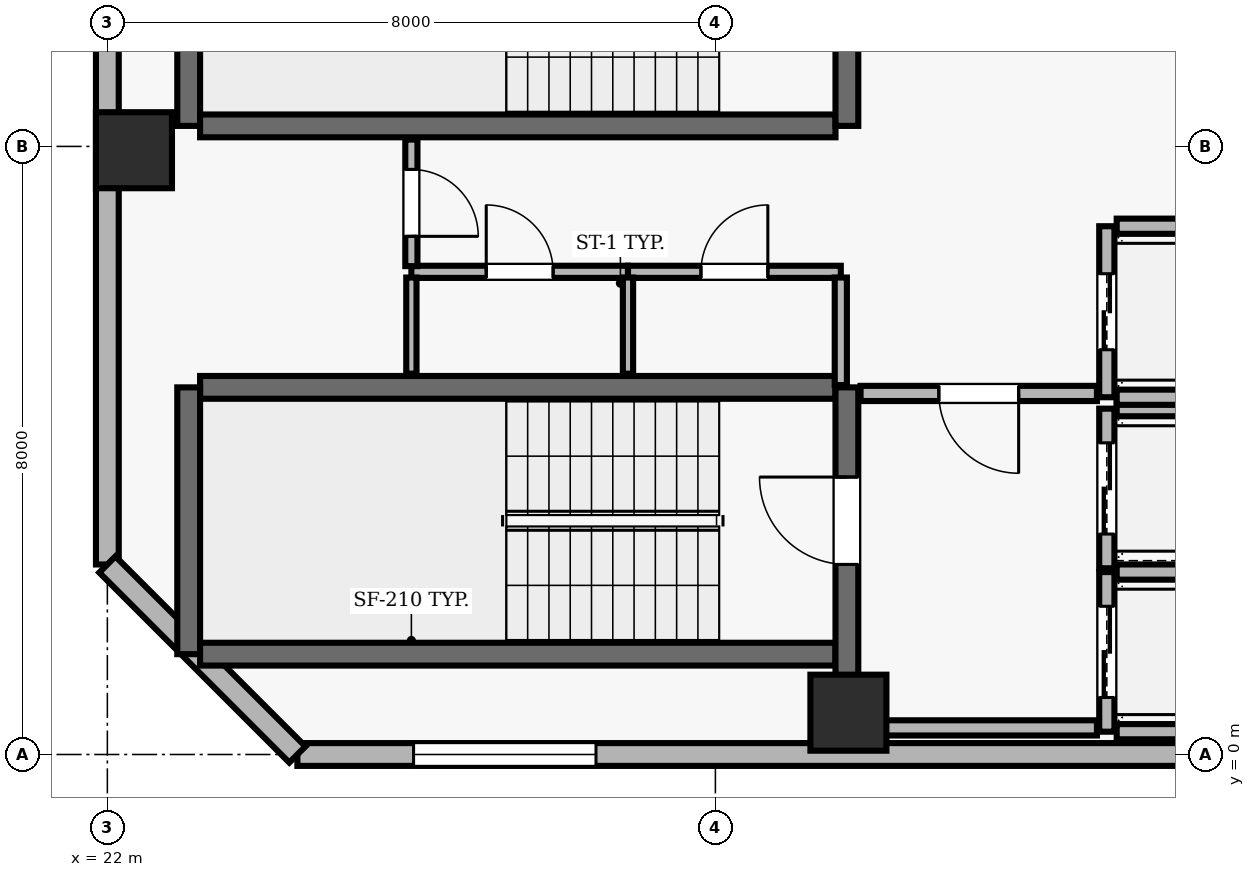
"""IFC4 building model, lengths in metres.
Left out: names, types, materials, properties, quantities, classifications, styles, units other than length and angle.
Written with IfcOpenShell. Run it as: python <this file> out.ifc"""

import sys

from ifc_helpers import new_model, si_unit, direction, frame, frame_2d, origin, origin_2d, place, context, subcontext, project, spatial, rectangle, extrude, element, fill, save


model = new_model("IFC4")
c1 = context("Model", 3, precision=1e-05, world=origin(), true_north=direction((0.0, 1.0)))
c2 = subcontext(c1, "Body", "Model", "MODEL_VIEW")
j1 = project(units=[si_unit("LENGTHUNIT", "METRE"), si_unit("PLANEANGLEUNIT", "RADIAN")], contexts=[c1])
p1 = place(None, origin())
s1 = spatial("IfcSite", under=j1, at=p1, CompositionType="ELEMENT")
p2 = place(p1, origin())
s2 = spatial("IfcBuilding", under=s1, at=p2, CompositionType="ELEMENT")
p3 = place(p2, frame((0.0, 0.0, 179.7)))
s3 = spatial("IfcBuildingStorey", under=s2, at=p3, CompositionType="ELEMENT", Elevation=179.7)
for number, where, z_axis, x_axis in (
    (1, (31.75, 0.55, 0.0), (0.0, 0.0, 1.0), (1.0, 0.0, 0.0)),
    (2, (22.35, 7.95, 0.0), (0.0, 0.0, 1.0), (1.0, 0.0, 0.0)),
):
    element("IfcColumn", number, at=place(p3, frame(where, z_axis=z_axis, x_axis=x_axis)), inside=s3, PredefinedType="COLUMN", context=c2, shape_type="SweptSolid", body=[
        extrude(rectangle(XDim=1.0, YDim=1.0, at=origin_2d()), origin(), (0.0, 0.0, 1.0), 3.9),
    ])
p4 = place(p3, frame((24.5, 0.0, 0.0), z_axis=(0.0, 0.0, 1.0), x_axis=(1.0, 0.0, 0.0)))
e3 = element("IfcWall", 3, at=p4, inside=s3, PredefinedType="SOLIDWALL", context=c2, shape_type="SweptSolid", body=[
    extrude(rectangle(XDim=38.2, YDim=0.3, at=frame_2d((19.1, 0.0))), origin(), (0.0, 0.0, 1.0), 3.69),
])
p5 = place(p4, frame((1.529, 0.0, 0.9)))
e4 = element("IfcOpeningElement", 4, at=p5, cuts=e3, PredefinedType="OPENING", context=c2, shape_type="SweptSolid", body=[
    extrude(rectangle(XDim=2.4, YDim=1.8, at=frame_2d((1.2, 0.9))), frame((0.0, 0.16, 0.0), z_axis=(0.0, -1.0, 0.0), x_axis=(1.0, 0.0, 0.0)), (0.0, 0.0, 1.0), 0.32),
])
p6 = place(p4, frame((17.9, 0.0, 0.9)))
e5 = element("IfcOpeningElement", 5, at=p6, cuts=e3, PredefinedType="OPENING", context=c2, shape_type="SweptSolid", body=[
    extrude(rectangle(XDim=2.4, YDim=1.8, at=frame_2d((1.2, 0.9))), frame((0.0, 0.16, 0.0), z_axis=(0.0, -1.0, 0.0), x_axis=(1.0, 0.0, 0.0)), (0.0, 0.0, 1.0), 0.32),
])
p7 = place(p4, frame((28.814, 0.0, 0.9)))
e6 = element("IfcOpeningElement", 6, at=p7, cuts=e3, PredefinedType="OPENING", context=c2, shape_type="SweptSolid", body=[
    extrude(rectangle(XDim=2.4, YDim=1.8, at=frame_2d((1.2, 0.9))), frame((0.0, 0.16, 0.0), z_axis=(0.0, -1.0, 0.0), x_axis=(1.0, 0.0, 0.0)), (0.0, 0.0, 1.0), 0.32),
])
p8 = place(p4, frame((34.271, 0.0, 0.9)))
e7 = element("IfcOpeningElement", 7, at=p8, cuts=e3, PredefinedType="OPENING", context=c2, shape_type="SweptSolid", body=[
    extrude(rectangle(XDim=2.4, YDim=1.8, at=frame_2d((1.2, 0.9))), frame((0.0, 0.16, 0.0), z_axis=(0.0, -1.0, 0.0), x_axis=(1.0, 0.0, 0.0)), (0.0, 0.0, 1.0), 0.32),
])
p9 = place(p3, frame((22.0, 40.7, 0.0), z_axis=(0.0, 0.0, 1.0), x_axis=(0.0, -1.0, 0.0)))
e8 = element("IfcWall", 8, at=p9, inside=s3, PredefinedType="SOLIDWALL", context=c2, shape_type="SweptSolid", body=[
    extrude(rectangle(XDim=38.2, YDim=0.3, at=frame_2d((19.1, 0.0))), origin(), (0.0, 0.0, 1.0), 3.69),
])
p10 = place(p9, frame((6.7, 0.0, 0.0)))
e9 = element("IfcOpeningElement", 9, at=p10, cuts=e8, PredefinedType="OPENING", context=c2, shape_type="SweptSolid", body=[
    extrude(rectangle(XDim=1.0, YDim=2.2, at=frame_2d((0.5, 1.1))), frame((0.0, 0.16, 0.0), z_axis=(0.0, -1.0, 0.0), x_axis=(1.0, 0.0, 0.0)), (0.0, 0.0, 1.0), 0.32),
])
p11 = place(p9, frame((11.543, 0.0, 0.9)))
e10 = element("IfcOpeningElement", 10, at=p11, cuts=e8, PredefinedType="OPENING", context=c2, shape_type="SweptSolid", body=[
    extrude(rectangle(XDim=2.4, YDim=1.8, at=frame_2d((1.2, 0.9))), frame((0.0, 0.16, 0.0), z_axis=(0.0, -1.0, 0.0), x_axis=(1.0, 0.0, 0.0)), (0.0, 0.0, 1.0), 0.32),
])
p12 = place(p9, frame((18.35, 0.0, 0.9)))
e11 = element("IfcOpeningElement", 11, at=p12, cuts=e8, PredefinedType="OPENING", context=c2, shape_type="SweptSolid", body=[
    extrude(rectangle(XDim=2.4, YDim=1.8, at=frame_2d((1.2, 0.9))), frame((0.0, 0.16, 0.0), z_axis=(0.0, -1.0, 0.0), x_axis=(1.0, 0.0, 0.0)), (0.0, 0.0, 1.0), 0.32),
])
p13 = place(p9, frame((22.907, 0.0, 0.9)))
e12 = element("IfcOpeningElement", 12, at=p13, cuts=e8, PredefinedType="OPENING", context=c2, shape_type="SweptSolid", body=[
    extrude(rectangle(XDim=2.4, YDim=1.8, at=frame_2d((1.2, 0.9))), frame((0.0, 0.16, 0.0), z_axis=(0.0, -1.0, 0.0), x_axis=(1.0, 0.0, 0.0)), (0.0, 0.0, 1.0), 0.32),
])
p14 = place(p9, frame((28.814, 0.0, 0.9)))
e13 = element("IfcOpeningElement", 13, at=p14, cuts=e8, PredefinedType="OPENING", context=c2, shape_type="SweptSolid", body=[
    extrude(rectangle(XDim=2.4, YDim=1.8, at=frame_2d((1.2, 0.9))), frame((0.0, 0.16, 0.0), z_axis=(0.0, -1.0, 0.0), x_axis=(1.0, 0.0, 0.0)), (0.0, 0.0, 1.0), 0.32),
])
p15 = place(p3, frame((22.0, 2.5, 0.0), z_axis=(0.0, 0.0, 1.0), x_axis=(0.707106781187, -0.707106781187, 0.0)))
e14 = element("IfcWall", 14, at=p15, inside=s3, PredefinedType="SOLIDWALL", context=c2, shape_type="SweptSolid", body=[
    extrude(rectangle(XDim=3.536, YDim=0.3, at=frame_2d((1.768, 0.0))), origin(), (0.0, 0.0, 1.0), 3.69),
])
p16 = place(p3, frame((31.58, 4.83, 0.0), z_axis=(0.0, 0.0, 1.0), x_axis=(-1.0, 0.0, 0.0)))
e15 = element("IfcWall", 15, at=p16, inside=s3, PredefinedType="SHEAR", context=c2, shape_type="SweptSolid", body=[
    extrude(rectangle(XDim=8.36, YDim=0.3, at=frame_2d((4.18, 0.0))), origin(), (0.0, 0.0, 1.0), 3.69),
])
p17 = place(p3, frame((23.07, 4.83, 0.0), z_axis=(0.0, 0.0, 1.0), x_axis=(0.0, -1.0, 0.0)))
e16 = element("IfcWall", 16, at=p17, inside=s3, PredefinedType="SHEAR", context=c2, shape_type="SweptSolid", body=[
    extrude(rectangle(XDim=3.51, YDim=0.3, at=frame_2d((1.755, 0.0))), origin(), (0.0, 0.0, 1.0), 3.69),
])
p18 = place(p3, frame((23.22, 1.32, 0.0), z_axis=(0.0, 0.0, 1.0), x_axis=(1.0, 0.0, 0.0)))
e17 = element("IfcWall", 17, at=p18, inside=s3, PredefinedType="SHEAR", context=c2, shape_type="SweptSolid", body=[
    extrude(rectangle(XDim=8.36, YDim=0.3, at=frame_2d((4.18, 0.0))), origin(), (0.0, 0.0, 1.0), 3.69),
])
p19 = place(p3, frame((31.73, 0.96, 0.0), z_axis=(0.0, 0.0, 1.0), x_axis=(0.0, 1.0, 0.0)))
e18 = element("IfcWall", 18, at=p19, inside=s3, PredefinedType="SHEAR", context=c2, shape_type="SweptSolid", body=[
    extrude(rectangle(XDim=3.87, YDim=0.3, at=frame_2d((1.935, 0.0))), origin(), (0.0, 0.0, 1.0), 3.69),
])
p20 = place(p19, frame((1.54, 0.0, 0.0)))
e19 = element("IfcOpeningElement", 19, at=p20, cuts=e18, PredefinedType="OPENING", context=c2, shape_type="SweptSolid", body=[
    extrude(rectangle(XDim=1.15, YDim=2.15, at=frame_2d((0.575, 1.075))), frame((0.0, 0.16, 0.0), z_axis=(0.0, -1.0, 0.0), x_axis=(1.0, 0.0, 0.0)), (0.0, 0.0, 1.0), 0.32),
])
p21 = place(p3, frame((23.07, 11.78, 0.0), z_axis=(0.0, 0.0, 1.0), x_axis=(0.0, -1.0, 0.0)))
e20 = element("IfcWall", 20, at=p21, inside=s3, PredefinedType="SHEAR", context=c2, shape_type="SweptSolid", body=[
    extrude(rectangle(XDim=3.51, YDim=0.3, at=frame_2d((1.755, 0.0))), origin(), (0.0, 0.0, 1.0), 3.69),
])
p22 = place(p3, frame((23.22, 8.27, 0.0), z_axis=(0.0, 0.0, 1.0), x_axis=(1.0, 0.0, 0.0)))
e21 = element("IfcWall", 21, at=p22, inside=s3, PredefinedType="SHEAR", context=c2, shape_type="SweptSolid", body=[
    extrude(rectangle(XDim=8.36, YDim=0.3, at=frame_2d((4.18, 0.0))), origin(), (0.0, 0.0, 1.0), 3.69),
])
p23 = place(p3, frame((31.73, 8.27, 0.0), z_axis=(0.0, 0.0, 1.0), x_axis=(0.0, 1.0, 0.0)))
e22 = element("IfcWall", 22, at=p23, inside=s3, PredefinedType="SHEAR", context=c2, shape_type="SweptSolid", body=[
    extrude(rectangle(XDim=3.51, YDim=0.3, at=frame_2d((1.755, 0.0))), origin(), (0.0, 0.0, 1.0), 3.69),
])
p24 = place(p23, frame((1.18, 0.0, 0.0)))
e23 = element("IfcOpeningElement", 23, at=p24, cuts=e22, PredefinedType="OPENING", context=c2, shape_type="SweptSolid", body=[
    extrude(rectangle(XDim=1.15, YDim=2.15, at=frame_2d((0.575, 1.075))), frame((0.0, 0.16, 0.0), z_axis=(0.0, -1.0, 0.0), x_axis=(1.0, 0.0, 0.0)), (0.0, 0.0, 1.0), 0.32),
])
p25 = place(p3, frame((35.15, 2.4, 0.0), z_axis=(0.0, 0.0, 1.0), x_axis=(0.0, -1.0, 0.0)))
e24 = element("IfcWall", 24, at=p25, inside=s3, PredefinedType="SOLIDWALL", context=c2, shape_type="SweptSolid", body=[
    extrude(rectangle(XDim=2.1, YDim=0.2, at=frame_2d((1.05, 0.0))), origin(), (0.0, 0.0, 1.0), 3.69),
])
p26 = place(p25, frame((0.45, 0.0, 0.0)))
e25 = element("IfcOpeningElement", 25, at=p26, cuts=e24, PredefinedType="OPENING", context=c2, shape_type="SweptSolid", body=[
    extrude(rectangle(XDim=1.2, YDim=2.15, at=frame_2d((0.6, 1.075))), frame((0.0, 0.11, 0.0), z_axis=(0.0, -1.0, 0.0), x_axis=(1.0, 0.0, 0.0)), (0.0, 0.0, 1.0), 0.22),
])
for number, where, z_axis, x_axis in (
    (26, (35.28, 0.3, 0.0), (0.0, 0.0, 1.0), (1.0, 0.0, 0.0)),
    (27, (37.42, 2.4, 0.0), (0.0, 0.0, 1.0), (-1.0, 0.0, 0.0)),
):
    element("IfcWall", number, at=place(p3, frame(where, z_axis=z_axis, x_axis=x_axis)), inside=s3, PredefinedType="SOLIDWALL", context=c2, shape_type="SweptSolid", body=[
        extrude(rectangle(XDim=2.14, YDim=0.2, at=frame_2d((1.07, 0.0))), origin(), (0.0, 0.0, 1.0), 3.69),
    ])
p27 = place(p3, frame((35.15, 4.55, 0.0), z_axis=(0.0, 0.0, 1.0), x_axis=(0.0, -1.0, 0.0)))
e28 = element("IfcWall", 28, at=p27, inside=s3, PredefinedType="SOLIDWALL", context=c2, shape_type="SweptSolid", body=[
    extrude(rectangle(XDim=2.1, YDim=0.2, at=frame_2d((1.05, 0.0))), origin(), (0.0, 0.0, 1.0), 3.69),
])
p28 = place(p27, frame((0.45, 0.0, 0.0)))
e29 = element("IfcOpeningElement", 29, at=p28, cuts=e28, PredefinedType="OPENING", context=c2, shape_type="SweptSolid", body=[
    extrude(rectangle(XDim=1.2, YDim=2.15, at=frame_2d((0.6, 1.075))), frame((0.0, 0.11, 0.0), z_axis=(0.0, -1.0, 0.0), x_axis=(1.0, 0.0, 0.0)), (0.0, 0.0, 1.0), 0.22),
])
p29 = place(p3, frame((37.42, 4.55, 0.0), z_axis=(0.0, 0.0, 1.0), x_axis=(-1.0, 0.0, 0.0)))
e30 = element("IfcWall", 30, at=p29, inside=s3, PredefinedType="SOLIDWALL", context=c2, shape_type="SweptSolid", body=[
    extrude(rectangle(XDim=2.14, YDim=0.2, at=frame_2d((1.07, 0.0))), origin(), (0.0, 0.0, 1.0), 3.69),
])
p30 = place(p3, frame((35.15, 6.95, 0.0), z_axis=(0.0, 0.0, 1.0), x_axis=(0.0, -1.0, 0.0)))
e31 = element("IfcWall", 31, at=p30, inside=s3, PredefinedType="SOLIDWALL", context=c2, shape_type="SweptSolid", body=[
    extrude(rectangle(XDim=2.25, YDim=0.2, at=frame_2d((1.125, 0.0))), origin(), (0.0, 0.0, 1.0), 3.69),
])
p31 = place(p30, frame((0.625, 0.0, 0.0)))
e32 = element("IfcOpeningElement", 32, at=p31, cuts=e31, PredefinedType="OPENING", context=c2, shape_type="SweptSolid", body=[
    extrude(rectangle(XDim=1.0, YDim=2.1, at=frame_2d((0.5, 1.05))), frame((0.0, 0.11, 0.0), z_axis=(0.0, -1.0, 0.0), x_axis=(1.0, 0.0, 0.0)), (0.0, 0.0, 1.0), 0.22),
])
for number, where, z_axis, x_axis in (
    (33, (35.28, 4.7, 0.0), (0.0, 0.0, 1.0), (1.0, 0.0, 0.0)),
    (34, (37.42, 6.95, 0.0), (0.0, 0.0, 1.0), (-1.0, 0.0, 0.0)),
):
    element("IfcWall", number, at=place(p3, frame(where, z_axis=z_axis, x_axis=x_axis)), inside=s3, PredefinedType="SOLIDWALL", context=c2, shape_type="SweptSolid", body=[
        extrude(rectangle(XDim=2.14, YDim=0.2, at=frame_2d((1.07, 0.0))), origin(), (0.0, 0.0, 1.0), 3.69),
    ])
p32 = place(p3, frame((26.0, 6.35, 0.0), z_axis=(0.0, 0.0, 1.0), x_axis=(1.0, 0.0, 0.0)))
e35 = element("IfcWall", 35, at=p32, inside=s3, PredefinedType="PARTITIONING", context=c2, shape_type="SweptSolid", body=[
    extrude(rectangle(XDim=2.85, YDim=0.16, at=frame_2d((1.425, 0.0))), origin(), (0.0, 0.0, 1.0), 3.69),
])
p33 = place(p32, frame((0.985, 0.0, 0.0)))
e36 = element("IfcOpeningElement", 36, at=p33, cuts=e35, PredefinedType="OPENING", context=c2, shape_type="SweptSolid", body=[
    extrude(rectangle(XDim=0.88, YDim=2.1, at=frame_2d((0.44, 1.05))), frame((0.0, 0.09, 0.0), z_axis=(0.0, -1.0, 0.0), x_axis=(1.0, 0.0, 0.0)), (0.0, 0.0, 1.0), 0.18),
])
p34 = place(p3, frame((28.85, 6.35, 0.0), z_axis=(0.0, 0.0, 1.0), x_axis=(1.0, 0.0, 0.0)))
e37 = element("IfcWall", 37, at=p34, inside=s3, PredefinedType="PARTITIONING", context=c2, shape_type="SweptSolid", body=[
    extrude(rectangle(XDim=2.8, YDim=0.16, at=frame_2d((1.4, 0.0))), origin(), (0.0, 0.0, 1.0), 3.69),
])
p35 = place(p34, frame((0.96, 0.0, 0.0)))
e38 = element("IfcOpeningElement", 38, at=p35, cuts=e37, PredefinedType="OPENING", context=c2, shape_type="SweptSolid", body=[
    extrude(rectangle(XDim=0.88, YDim=2.1, at=frame_2d((0.44, 1.05))), frame((0.0, 0.09, 0.0), z_axis=(0.0, -1.0, 0.0), x_axis=(1.0, 0.0, 0.0)), (0.0, 0.0, 1.0), 0.18),
])
p36 = place(p3, frame((31.65, 0.35, 0.0), z_axis=(0.0, 0.0, 1.0), x_axis=(1.0, 0.0, 0.0)))
e39 = element("IfcWall", 39, at=p36, inside=s3, PredefinedType="SOLIDWALL", context=c2, shape_type="SweptSolid", body=[
    extrude(rectangle(XDim=3.37, YDim=0.2, at=frame_2d((1.685, 0.0))), origin(), (0.0, 0.0, 1.0), 3.69),
])
p37 = place(p3, frame((35.02, 4.75, 0.0), z_axis=(0.0, 0.0, 1.0), x_axis=(-1.0, 0.0, 0.0)))
e40 = element("IfcWall", 40, at=p37, inside=s3, PredefinedType="SOLIDWALL", context=c2, shape_type="SweptSolid", body=[
    extrude(rectangle(XDim=3.11, YDim=0.2, at=frame_2d((1.555, 0.0))), origin(), (0.0, 0.0, 1.0), 3.69),
])
p38 = place(p37, frame((1.03, 0.0, 0.0)))
e41 = element("IfcOpeningElement", 41, at=p38, cuts=e40, PredefinedType="OPENING", context=c2, shape_type="SweptSolid", body=[
    extrude(rectangle(XDim=1.05, YDim=2.15, at=frame_2d((0.525, 1.075))), frame((0.0, 0.11, 0.0), z_axis=(0.0, -1.0, 0.0), x_axis=(1.0, 0.0, 0.0)), (0.0, 0.0, 1.0), 0.22),
])
p39 = place(p3, frame((26.0, 5.01, 0.0), z_axis=(0.0, 0.0, 1.0), x_axis=(0.0, 1.0, 0.0)))
e42 = element("IfcWall", 42, at=p39, inside=s3, PredefinedType="PARTITIONING", context=c2, shape_type="SweptSolid", body=[
    extrude(rectangle(XDim=1.265, YDim=0.135, at=frame_2d((0.632, 0.0))), origin(), (0.0, 0.0, 1.0), 3.69),
])
p40 = place(p3, frame((26.0, 8.09, 0.0), z_axis=(0.0, 0.0, 1.0), x_axis=(0.0, -1.0, 0.0)))
e43 = element("IfcWall", 43, at=p40, inside=s3, PredefinedType="PARTITIONING", context=c2, shape_type="SweptSolid", body=[
    extrude(rectangle(XDim=1.665, YDim=0.16, at=frame_2d((0.833, 0.0))), origin(), (0.0, 0.0, 1.0), 3.69),
])
p41 = place(p40, frame((0.393, 0.0, 0.0)))
e44 = element("IfcOpeningElement", 44, at=p41, cuts=e43, PredefinedType="OPENING", context=c2, shape_type="SweptSolid", body=[
    extrude(rectangle(XDim=0.88, YDim=2.1, at=frame_2d((0.44, 1.05))), frame((0.0, 0.09, 0.0), z_axis=(0.0, -1.0, 0.0), x_axis=(1.0, 0.0, 0.0)), (0.0, 0.0, 1.0), 0.18),
])
p42 = place(p3, frame((28.85, 5.01, 0.0), z_axis=(0.0, 0.0, 1.0), x_axis=(0.0, 1.0, 0.0)))
e45 = element("IfcWall", 45, at=p42, inside=s3, PredefinedType="PARTITIONING", context=c2, shape_type="SweptSolid", body=[
    extrude(rectangle(XDim=1.265, YDim=0.135, at=frame_2d((0.632, 0.0))), origin(), (0.0, 0.0, 1.0), 3.69),
])
p43 = place(p3, frame((31.65, 4.86, 0.0), z_axis=(0.0, 0.0, 1.0), x_axis=(0.0, 1.0, 0.0)))
e46 = element("IfcWall", 46, at=p43, inside=s3, PredefinedType="PARTITIONING", context=c2, shape_type="SweptSolid", body=[
    extrude(rectangle(XDim=1.415, YDim=0.16, at=frame_2d((0.708, 0.0))), origin(), (0.0, 0.0, 1.0), 3.69),
])
p44 = place(p5, origin())
e47 = element("IfcWindow", 47, at=p44, inside=s3, PartitioningType="SINGLE_PANEL", PredefinedType="WINDOW", context=c2, shape_type="SweptSolid", body=[
    extrude(rectangle(XDim=2.4, YDim=1.8, at=frame_2d((1.2, 0.9))), frame((0.0, 0.03, 0.0), z_axis=(0.0, -1.0, 0.0), x_axis=(1.0, 0.0, 0.0)), (0.0, 0.0, 1.0), 0.06),
])
fill(e4, e47)
p45 = place(p20, origin())
e48 = element("IfcDoor", 48, at=p45, inside=s3, OperationType="SINGLE_SWING_RIGHT", PredefinedType="DOOR", context=c2, shape_type="SweptSolid", body=[
    extrude(rectangle(XDim=1.15, YDim=2.15, at=frame_2d((0.575, 1.075))), frame((0.0, 0.025, 0.0), z_axis=(0.0, -1.0, 0.0), x_axis=(1.0, 0.0, 0.0)), (0.0, 0.0, 1.0), 0.05),
])
fill(e19, e48)
p46 = place(p26, origin())
e49 = element("IfcDoor", 49, at=p46, inside=s3, OperationType="DOUBLE_DOOR_SLIDING", PredefinedType="DOOR", context=c2, shape_type="SweptSolid", body=[
    extrude(rectangle(XDim=1.2, YDim=2.15, at=frame_2d((0.6, 1.075))), frame((0.0, 0.025, 0.0), z_axis=(0.0, -1.0, 0.0), x_axis=(1.0, 0.0, 0.0)), (0.0, 0.0, 1.0), 0.05),
])
fill(e25, e49)
p47 = place(p28, origin())
e50 = element("IfcDoor", 50, at=p47, inside=s3, OperationType="DOUBLE_DOOR_SLIDING", PredefinedType="DOOR", context=c2, shape_type="SweptSolid", body=[
    extrude(rectangle(XDim=1.2, YDim=2.15, at=frame_2d((0.6, 1.075))), frame((0.0, 0.025, 0.0), z_axis=(0.0, -1.0, 0.0), x_axis=(1.0, 0.0, 0.0)), (0.0, 0.0, 1.0), 0.05),
])
fill(e29, e50)
p48 = place(p31, origin())
e51 = element("IfcDoor", 51, at=p48, inside=s3, OperationType="DOUBLE_DOOR_SLIDING", PredefinedType="DOOR", context=c2, shape_type="SweptSolid", body=[
    extrude(rectangle(XDim=1.0, YDim=2.1, at=frame_2d((0.5, 1.05))), frame((0.0, 0.025, 0.0), z_axis=(0.0, -1.0, 0.0), x_axis=(1.0, 0.0, 0.0)), (0.0, 0.0, 1.0), 0.05),
])
fill(e32, e51)
p49 = place(p38, origin())
e52 = element("IfcDoor", 52, at=p49, inside=s3, OperationType="SINGLE_SWING_LEFT", PredefinedType="DOOR", context=c2, shape_type="SweptSolid", body=[
    extrude(rectangle(XDim=1.05, YDim=2.15, at=frame_2d((0.525, 1.075))), frame((0.0, 0.025, 0.0), z_axis=(0.0, -1.0, 0.0), x_axis=(1.0, 0.0, 0.0)), (0.0, 0.0, 1.0), 0.05),
])
fill(e41, e52)
p50 = place(p41, origin())
e53 = element("IfcDoor", 53, at=p50, inside=s3, OperationType="SINGLE_SWING_RIGHT", PredefinedType="DOOR", context=c2, shape_type="SweptSolid", body=[
    extrude(rectangle(XDim=0.88, YDim=2.1, at=frame_2d((0.44, 1.05))), frame((0.0, 0.025, 0.0), z_axis=(0.0, -1.0, 0.0), x_axis=(1.0, 0.0, 0.0)), (0.0, 0.0, 1.0), 0.05),
])
fill(e44, e53)
p51 = place(p33, origin())
e54 = element("IfcDoor", 54, at=p51, inside=s3, OperationType="SINGLE_SWING_LEFT", PredefinedType="DOOR", context=c2, shape_type="SweptSolid", body=[
    extrude(rectangle(XDim=0.88, YDim=2.1, at=frame_2d((0.44, 1.05))), frame((0.0, 0.025, 0.0), z_axis=(0.0, -1.0, 0.0), x_axis=(1.0, 0.0, 0.0)), (0.0, 0.0, 1.0), 0.05),
])
fill(e36, e54)
p52 = place(p35, origin())
e55 = element("IfcDoor", 55, at=p52, inside=s3, OperationType="SINGLE_SWING_RIGHT", PredefinedType="DOOR", context=c2, shape_type="SweptSolid", body=[
    extrude(rectangle(XDim=0.88, YDim=2.1, at=frame_2d((0.44, 1.05))), frame((0.0, 0.025, 0.0), z_axis=(0.0, -1.0, 0.0), x_axis=(1.0, 0.0, 0.0)), (0.0, 0.0, 1.0), 0.05),
])
fill(e38, e55)
save(model, sys.argv[1])
